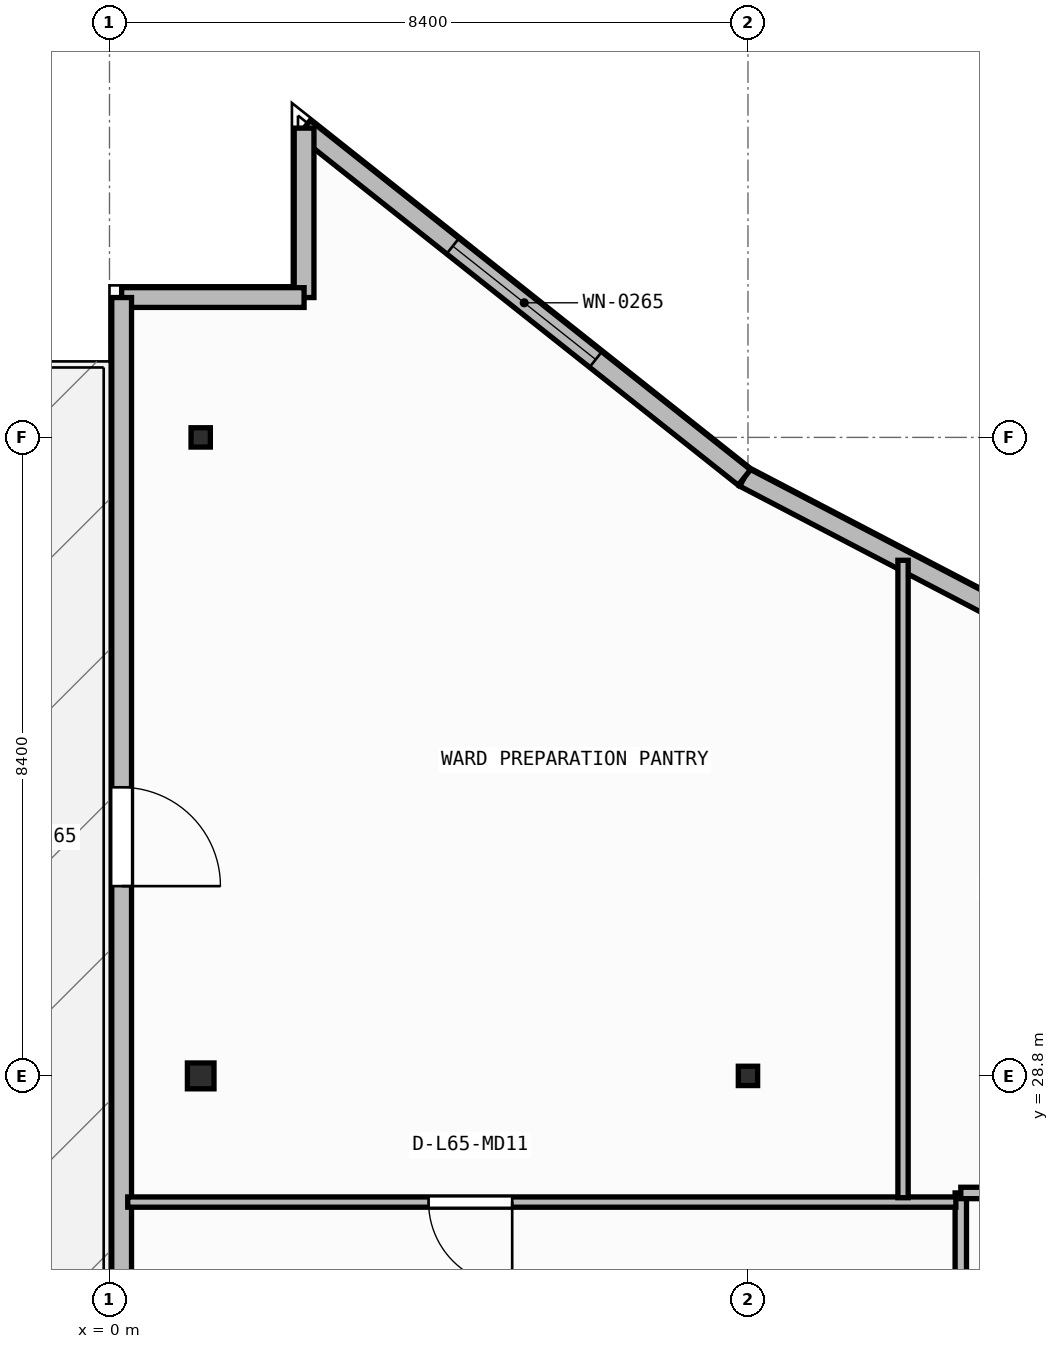
"""IFC4 building model, lengths in metres.
Left out: names, types, materials, properties, quantities, classifications, styles, units other than length and angle.
Written with IfcOpenShell. Run it as: python <this file> out.ifc"""

import sys

from ifc_helpers import new_model, si_unit, direction, frame, frame_2d, origin, origin_2d, place, context, subcontext, project, spatial, rectangle, i_section, extrude, element, fill, save


model = new_model("IFC4")
c1 = context("Model", 3, precision=1e-05, world=origin(), true_north=direction((0.0, 1.0)))
c2 = subcontext(c1, "Body", "Model", "MODEL_VIEW")
j1 = project(units=[si_unit("LENGTHUNIT", "METRE"), si_unit("PLANEANGLEUNIT", "RADIAN")], contexts=[c1])
p1 = place(None, origin())
s1 = spatial("IfcSite", under=j1, at=p1, CompositionType="ELEMENT")
p2 = place(p1, origin())
s2 = spatial("IfcBuilding", under=s1, at=p2, CompositionType="ELEMENT")
p3 = place(p2, frame((0.0, 0.0, 264.45)))
s3 = spatial("IfcBuildingStorey", under=s2, at=p3, CompositionType="ELEMENT", Elevation=264.45)
p4 = place(p3, frame((1.2, 28.8, 0.0), z_axis=(0.0, 0.0, 1.0), x_axis=(1.0, 0.0, 0.0)))
e1 = element("IfcColumn", 1, at=p4, inside=s3, PredefinedType="COLUMN", context=c2, shape_type="SweptSolid", body=[
    extrude(i_section(OverallWidth=0.35, OverallDepth=0.34, WebThickness=0.016, FlangeThickness=0.028, at=origin_2d()), origin(), (0.0, 0.0, 1.0), 3.95),
])
for number, where, z_axis, x_axis in (
    (2, (8.4, 28.8, 0.0), (0.0, 0.0, 1.0), (1.0, 0.0, 0.0)),
    (3, (1.2, 37.2, 0.0), (0.0, 0.0, 1.0), (1.0, 0.0, 0.0)),
):
    element("IfcColumn", number, at=place(p3, frame(where, z_axis=z_axis, x_axis=x_axis)), inside=s3, PredefinedType="COLUMN", context=c2, shape_type="SweptSolid", body=[
        extrude(i_section(OverallWidth=0.254, OverallDepth=0.254, WebThickness=0.009, FlangeThickness=0.014, FilletRadius=0.013, at=origin_2d()), origin(), (0.0, 0.0, 1.0), 3.95),
    ])
p5 = place(p3, frame((17.673, 31.806, 0.0), z_axis=(0.0, 0.0, 1.0), x_axis=(-0.886426635565, 0.462869117311, 0.0)))
e4 = element("IfcWall", 4, at=p5, inside=s3, PredefinedType="STANDARD", context=c2, shape_type="SweptSolid", body=[
    extrude(rectangle(XDim=10.514, YDim=0.26, at=frame_2d((5.257, 0.0))), origin(), (0.0, 0.0, 1.0), 3.71),
])
p6 = place(p5, frame((4.057, 0.0, 0.9)))
e5 = element("IfcOpeningElement", 5, at=p6, cuts=e4, PredefinedType="OPENING", context=c2, shape_type="SweptSolid", body=[
    extrude(rectangle(XDim=2.4, YDim=1.65, at=frame_2d((1.2, 0.825))), frame((0.0, 0.14, 0.0), z_axis=(0.0, -1.0, 0.0), x_axis=(1.0, 0.0, 0.0)), (0.0, 0.0, 1.0), 0.28),
])
p7 = place(p3, frame((8.353, 36.673, 0.0), z_axis=(0.0, 0.0, 1.0), x_axis=(-0.783387911746, 0.621533088203, 0.0)))
e6 = element("IfcWall", 6, at=p7, inside=s3, PredefinedType="STANDARD", context=c2, shape_type="SweptSolid", body=[
    extrude(rectangle(XDim=7.394, YDim=0.26, at=frame_2d((3.697, 0.0))), origin(), (0.0, 0.0, 1.0), 3.71),
])
p8 = place(p7, frame((2.497, 0.0, 0.9)))
e7 = element("IfcOpeningElement", 7, at=p8, cuts=e6, PredefinedType="OPENING", context=c2, shape_type="SweptSolid", body=[
    extrude(rectangle(XDim=2.4, YDim=1.65, at=frame_2d((1.2, 0.825))), frame((0.0, 0.14, 0.0), z_axis=(0.0, -1.0, 0.0), x_axis=(1.0, 0.0, 0.0)), (0.0, 0.0, 1.0), 0.28),
])
p9 = place(p3, frame((2.56, 41.269, 0.0), z_axis=(0.0, 0.0, 1.0), x_axis=(0.0, -1.0, 0.0)))
e8 = element("IfcWall", 8, at=p9, inside=s3, PredefinedType="STANDARD", context=c2, shape_type="SweptSolid", body=[
    extrude(rectangle(XDim=2.229, YDim=0.26, at=frame_2d((1.114, 0.0))), origin(), (0.0, 0.0, 1.0), 3.71),
])
p10 = place(p3, frame((2.56, 39.04, 0.0), z_axis=(0.0, 0.0, 1.0), x_axis=(-1.0, 0.0, 0.0)))
e9 = element("IfcWall", 9, at=p10, inside=s3, PredefinedType="STANDARD", context=c2, shape_type="SweptSolid", body=[
    extrude(rectangle(XDim=2.4, YDim=0.26, at=frame_2d((1.2, 0.0))), origin(), (0.0, 0.0, 1.0), 3.71),
])
p11 = place(p3, frame((0.16, 39.04, 0.0), z_axis=(0.0, 0.0, 1.0), x_axis=(0.0, -1.0, 0.0)))
e10 = element("IfcWall", 10, at=p11, inside=s3, PredefinedType="STANDARD", context=c2, shape_type="SweptSolid", body=[
    extrude(rectangle(XDim=36.48, YDim=0.26, at=frame_2d((18.24, 0.0))), origin(), (0.0, 0.0, 1.0), 3.71),
])
p12 = place(p11, frame((6.443, 0.0, 0.0)))
e11 = element("IfcOpeningElement", 11, at=p12, cuts=e10, PredefinedType="OPENING", context=c2, shape_type="SweptSolid", body=[
    extrude(rectangle(XDim=1.3, YDim=2.15, at=frame_2d((0.65, 1.075))), frame((0.0, 0.14, 0.0), z_axis=(0.0, -1.0, 0.0), x_axis=(1.0, 0.0, 0.0)), (0.0, 0.0, 1.0), 0.28),
])
p13 = place(p3, frame((11.2, 27.26, 0.0), z_axis=(0.0, 0.0, 1.0), x_axis=(0.0, -1.0, 0.0)))
e12 = element("IfcWall", 12, at=p13, inside=s3, PredefinedType="PARTITIONING", context=c2, shape_type="SweptSolid", body=[
    extrude(rectangle(XDim=6.192, YDim=0.15, at=frame_2d((3.096, 0.0))), origin(), (0.0, 0.0, 1.0), 3.71),
])
p14 = place(p13, frame((2.546, 0.0, 0.0)))
e13 = element("IfcOpeningElement", 13, at=p14, cuts=e12, PredefinedType="OPENING", context=c2, shape_type="SweptSolid", body=[
    extrude(rectangle(XDim=1.1, YDim=2.1, at=frame_2d((0.55, 1.05))), frame((0.0, 0.085, 0.0), z_axis=(0.0, -1.0, 0.0), x_axis=(1.0, 0.0, 0.0)), (0.0, 0.0, 1.0), 0.17),
])
p15 = place(p3, frame((13.7, 27.26, 0.0), z_axis=(0.0, 0.0, 1.0), x_axis=(-1.0, 0.0, 0.0)))
e14 = element("IfcWall", 14, at=p15, inside=s3, PredefinedType="PARTITIONING", context=c2, shape_type="SweptSolid", body=[
    extrude(rectangle(XDim=2.5, YDim=0.15, at=frame_2d((1.25, 0.0))), origin(), (0.0, 0.0, 1.0), 3.71),
])
p16 = place(p15, frame((0.7, 0.0, 0.0)))
e15 = element("IfcOpeningElement", 15, at=p16, cuts=e14, PredefinedType="OPENING", context=c2, shape_type="SweptSolid", body=[
    extrude(rectangle(XDim=1.1, YDim=2.1, at=frame_2d((0.55, 1.05))), frame((0.0, 0.085, 0.0), z_axis=(0.0, -1.0, 0.0), x_axis=(1.0, 0.0, 0.0)), (0.0, 0.0, 1.0), 0.17),
])
p17 = place(p3, frame((11.135, 27.14, 0.0), z_axis=(0.0, 0.0, 1.0), x_axis=(-1.0, 0.0, 0.0)))
e16 = element("IfcWall", 16, at=p17, inside=s3, PredefinedType="PARTITIONING", context=c2, shape_type="SweptSolid", body=[
    extrude(rectangle(XDim=10.895, YDim=0.135, at=frame_2d((5.448, 0.0))), origin(), (0.0, 0.0, 1.0), 3.71),
])
p18 = place(p17, frame((5.837, 0.0, 0.0)))
e17 = element("IfcOpeningElement", 17, at=p18, cuts=e16, PredefinedType="OPENING", context=c2, shape_type="SweptSolid", body=[
    extrude(rectangle(XDim=1.1, YDim=2.1, at=frame_2d((0.55, 1.05))), frame((0.0, 0.077, 0.0), z_axis=(0.0, -1.0, 0.0), x_axis=(1.0, 0.0, 0.0)), (0.0, 0.0, 1.0), 0.155),
])
p19 = place(p3, frame((10.44, 27.198, 0.0), z_axis=(0.0, 0.0, 1.0), x_axis=(0.0, 1.0, 0.0)))
e18 = element("IfcWall", 18, at=p19, inside=s3, PredefinedType="PARTITIONING", context=c2, shape_type="SweptSolid", body=[
    extrude(rectangle(XDim=8.385, YDim=0.135, at=frame_2d((4.193, 0.0))), origin(), (0.0, 0.0, 1.0), 3.71),
])
p20 = place(p8, origin())
e19 = element("IfcWindow", 19, at=p20, inside=s3, PartitioningType="SINGLE_PANEL", PredefinedType="WINDOW", context=c2, shape_type="SweptSolid", body=[
    extrude(rectangle(XDim=2.4, YDim=1.65, at=frame_2d((1.2, 0.825))), frame((0.0, 0.03, 0.0), z_axis=(0.0, -1.0, 0.0), x_axis=(1.0, 0.0, 0.0)), (0.0, 0.0, 1.0), 0.06),
])
fill(e7, e19)
p21 = place(p12, origin())
e20 = element("IfcDoor", 20, at=p21, inside=s3, OperationType="SINGLE_SWING_RIGHT", PredefinedType="DOOR", context=c2, shape_type="SweptSolid", body=[
    extrude(rectangle(XDim=1.3, YDim=2.15, at=frame_2d((0.65, 1.075))), frame((0.0, 0.025, 0.0), z_axis=(0.0, -1.0, 0.0), x_axis=(1.0, 0.0, 0.0)), (0.0, 0.0, 1.0), 0.05),
])
fill(e11, e20)
p22 = place(p18, origin())
e21 = element("IfcDoor", 21, at=p22, inside=s3, OperationType="SINGLE_SWING_LEFT", PredefinedType="DOOR", context=c2, shape_type="SweptSolid", body=[
    extrude(rectangle(XDim=1.1, YDim=2.1, at=frame_2d((0.55, 1.05))), frame((0.0, 0.025, 0.0), z_axis=(0.0, -1.0, 0.0), x_axis=(1.0, 0.0, 0.0)), (0.0, 0.0, 1.0), 0.05),
])
fill(e17, e21)
save(model, sys.argv[1])
